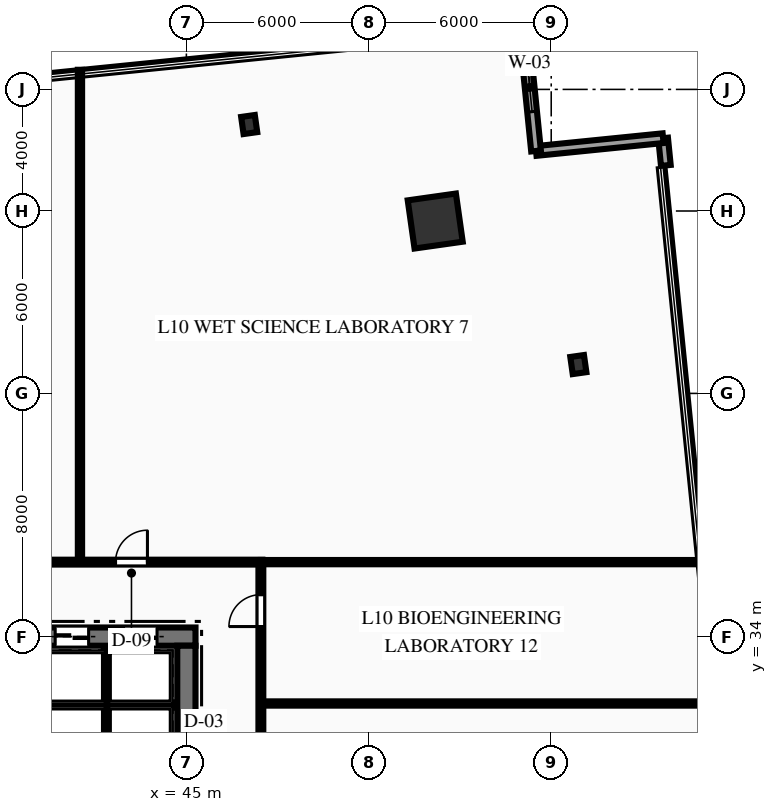
"""IFC4 building model, lengths in metres.
Left out: names, types, materials, properties, quantities, classifications, styles, units other than length and angle.
Written with IfcOpenShell. Run it as: python <this file> out.ifc"""

import sys

from ifc_helpers import new_model, si_unit, direction, frame, frame_2d, origin, origin_2d, place, context, subcontext, project, spatial, rectangle, hollow_rectangle, i_section, extrude, element, fill, save


model = new_model("IFC4")
c1 = context("Model", 3, precision=1e-05, world=origin(), true_north=direction((0.0, 1.0)))
c2 = subcontext(c1, "Body", "Model", "MODEL_VIEW")
j1 = project(units=[si_unit("LENGTHUNIT", "METRE"), si_unit("PLANEANGLEUNIT", "RADIAN")], contexts=[c1])
p1 = place(None, origin())
s1 = spatial("IfcSite", under=j1, at=p1, CompositionType="ELEMENT")
p2 = place(p1, origin())
s2 = spatial("IfcBuilding", under=s1, at=p2, CompositionType="ELEMENT")
p3 = place(p2, frame((0.0, 0.0, 47.7)))
s3 = spatial("IfcBuildingStorey", under=s2, at=p3, CompositionType="ELEMENT", Elevation=47.7)
p4 = place(p3, frame((26.7, 34.0, 0.0), z_axis=(0.0, 0.0, 1.0), x_axis=(1.0, 0.0, 0.0)))
e1 = element("IfcWall", 1, at=p4, inside=s3, PredefinedType="SHEAR", context=c2, shape_type="SweptSolid", body=[
    extrude(rectangle(XDim=18.6, YDim=0.6, at=frame_2d((9.3, 0.0))), origin(), (0.0, 0.0, 1.0), 3.75),
])
p5 = place(p4, frame((1.265, 0.0, 0.0)))
e2 = element("IfcOpeningElement", 2, at=p5, cuts=e1, PredefinedType="OPENING", context=c2, shape_type="SweptSolid", body=[
    extrude(rectangle(XDim=1.1, YDim=2.15, at=frame_2d((0.55, 1.075))), frame((0.0, 0.31, 0.0), z_axis=(0.0, -1.0, 0.0), x_axis=(1.0, 0.0, 0.0)), (0.0, 0.0, 1.0), 0.62),
])
p6 = place(p4, frame((3.515, 0.0, 0.0)))
e3 = element("IfcOpeningElement", 3, at=p6, cuts=e1, PredefinedType="OPENING", context=c2, shape_type="SweptSolid", body=[
    extrude(rectangle(XDim=1.1, YDim=2.15, at=frame_2d((0.55, 1.075))), frame((0.0, 0.31, 0.0), z_axis=(0.0, -1.0, 0.0), x_axis=(1.0, 0.0, 0.0)), (0.0, 0.0, 1.0), 0.62),
])
p7 = place(p4, frame((13.985, 0.0, 0.0)))
e4 = element("IfcOpeningElement", 4, at=p7, cuts=e1, PredefinedType="OPENING", context=c2, shape_type="SweptSolid", body=[
    extrude(rectangle(XDim=1.1, YDim=2.15, at=frame_2d((0.55, 1.075))), frame((0.0, 0.31, 0.0), z_axis=(0.0, -1.0, 0.0), x_axis=(1.0, 0.0, 0.0)), (0.0, 0.0, 1.0), 0.62),
])
p8 = place(p4, frame((16.235, 0.0, 0.0)))
e5 = element("IfcOpeningElement", 5, at=p8, cuts=e1, PredefinedType="OPENING", context=c2, shape_type="SweptSolid", body=[
    extrude(rectangle(XDim=1.1, YDim=2.15, at=frame_2d((0.55, 1.075))), frame((0.0, 0.31, 0.0), z_axis=(0.0, -1.0, 0.0), x_axis=(1.0, 0.0, 0.0)), (0.0, 0.0, 1.0), 0.62),
])
p9 = place(p3, frame((45.0, 18.3, 0.0), z_axis=(0.0, 0.0, 1.0), x_axis=(0.0, 1.0, 0.0)))
e6 = element("IfcWall", 6, at=p9, inside=s3, PredefinedType="SHEAR", context=c2, shape_type="SweptSolid", body=[
    extrude(rectangle(XDim=15.4, YDim=0.6, at=frame_2d((7.7, 0.0))), origin(), (0.0, 0.0, 1.0), 3.75),
])
p10 = place(p9, frame((9.94, 0.0, 0.0)))
e7 = element("IfcOpeningElement", 7, at=p10, cuts=e6, PredefinedType="OPENING", context=c2, shape_type="SweptSolid", body=[
    extrude(rectangle(XDim=1.4, YDim=2.2, at=frame_2d((0.7, 1.1))), frame((0.0, 0.31, 0.0), z_axis=(0.0, -1.0, 0.0), x_axis=(1.0, 0.0, 0.0)), (0.0, 0.0, 1.0), 0.62),
])
p11 = place(p3, frame((53.185, 47.67, 0.0), z_axis=(0.0, 0.0, 1.0), x_axis=(0.990146240249, 0.140037219771, 0.0)))
e8 = element("IfcColumn", 8, at=p11, inside=s3, PredefinedType="COLUMN", context=c2, shape_type="SweptSolid", body=[
    extrude(hollow_rectangle(XDim=1.6, YDim=1.6, WallThickness=0.08, at=origin_2d()), origin(), (0.0, 0.0, 1.0), 3.75),
])
for number, where, z_axis, x_axis in (
    (9, (57.892, 42.949, 0.0), (0.0, 0.0, 1.0), (0.99, 0.14, 0.0)),
    (10, (47.066, 50.844, 0.0), (0.0, 0.0, 1.0), (0.99, 0.14, 0.0)),
):
    element("IfcColumn", number, at=place(p3, frame(where, z_axis=z_axis, x_axis=x_axis)), inside=s3, PredefinedType="COLUMN", context=c2, shape_type="SweptSolid", body=[
        extrude(i_section(OverallWidth=0.454, OverallDepth=0.569, WebThickness=0.078, FlangeThickness=0.125, at=origin_2d()), origin(), (0.0, 0.0, 1.0), 3.75),
    ])
p12 = place(p3, frame((60.68, 50.396, 0.0), z_axis=(0.0, 0.0, 1.0), x_axis=(0.100094562617, -0.994977928667, 0.0)))
e11 = element("IfcWall", 11, at=p12, inside=s3, PredefinedType="STANDARD", context=c2, shape_type="SweptSolid", body=[
    extrude(rectangle(XDim=0.9, YDim=0.32, at=frame_2d((0.45, 0.0))), origin(), (0.0, 0.0, 1.0), 3.44),
])
p13 = place(p3, frame((56.501, 49.975, 0.0), z_axis=(0.0, 0.0, 1.0), x_axis=(0.994966149633, 0.100211581584, 0.0)))
e12 = element("IfcWall", 12, at=p13, inside=s3, PredefinedType="STANDARD", context=c2, shape_type="SweptSolid", body=[
    extrude(rectangle(XDim=4.2, YDim=0.32, at=frame_2d((2.1, 0.0))), origin(), (0.0, 0.0, 1.0), 3.44),
])
p14 = place(p3, frame((56.08, 54.154, 0.0), z_axis=(0.0, 0.0, 1.0), x_axis=(0.100211581584, -0.994966149633, 0.0)))
e13 = element("IfcWall", 13, at=p14, inside=s3, PredefinedType="STANDARD", context=c2, shape_type="SweptSolid", body=[
    extrude(rectangle(XDim=4.2, YDim=0.32, at=frame_2d((2.1, 0.0))), origin(), (0.0, 0.0, 1.0), 3.44),
])
p15 = place(p14, frame((1.3, 0.0, 0.85)))
e14 = element("IfcOpeningElement", 14, at=p15, cuts=e13, PredefinedType="OPENING", context=c2, shape_type="SweptSolid", body=[
    extrude(rectangle(XDim=1.6, YDim=2.1, at=frame_2d((0.8, 1.05))), frame((0.0, 0.17, 0.0), z_axis=(0.0, -1.0, 0.0), x_axis=(1.0, 0.0, 0.0)), (0.0, 0.0, 1.0), 0.34),
])
p16 = place(p3, frame((40.12, 31.75, 0.0), z_axis=(0.0, 0.0, 1.0), x_axis=(1.0, 0.0, 0.0)))
e15 = element("IfcWall", 15, at=p16, inside=s3, PredefinedType="PARTITIONING", context=c2, shape_type="SweptSolid", body=[
    extrude(rectangle(XDim=4.43, YDim=0.18, at=frame_2d((2.215, 0.0))), origin(), (0.0, 0.0, 1.0), 3.44),
])
p17 = place(p3, frame((42.37, 29.9, 0.0), z_axis=(0.0, 0.0, 1.0), x_axis=(0.0, 1.0, 0.0)))
e16 = element("IfcWall", 16, at=p17, inside=s3, PredefinedType="PARTITIONING", context=c2, shape_type="SweptSolid", body=[
    extrude(rectangle(XDim=3.75, YDim=0.18, at=frame_2d((1.875, 0.0))), origin(), (0.0, 0.0, 1.0), 3.44),
])
p18 = place(p3, frame((24.5, 36.45, 0.0), z_axis=(0.0, 0.0, 1.0), x_axis=(1.0, 0.0, 0.0)))
e17 = element("IfcWall", 17, at=p18, inside=s3, PredefinedType="PARTITIONING", context=c2, shape_type="SweptSolid", body=[
    extrude(rectangle(XDim=23.0, YDim=0.16, at=frame_2d((11.5, 0.0))), origin(), (0.0, 0.0, 1.0), 3.44),
])
p19 = place(p18, frame((1.25, 0.0, 0.0)))
e18 = element("IfcOpeningElement", 18, at=p19, cuts=e17, PredefinedType="OPENING", context=c2, shape_type="SweptSolid", body=[
    extrude(rectangle(XDim=0.9, YDim=2.15, at=frame_2d((0.45, 1.075))), frame((0.0, 0.09, 0.0), z_axis=(0.0, -1.0, 0.0), x_axis=(1.0, 0.0, 0.0)), (0.0, 0.0, 1.0), 0.18),
])
p20 = place(p18, frame((3.55, 0.0, 0.0)))
e19 = element("IfcOpeningElement", 19, at=p20, cuts=e17, PredefinedType="OPENING", context=c2, shape_type="SweptSolid", body=[
    extrude(rectangle(XDim=0.9, YDim=2.15, at=frame_2d((0.45, 1.075))), frame((0.0, 0.09, 0.0), z_axis=(0.0, -1.0, 0.0), x_axis=(1.0, 0.0, 0.0)), (0.0, 0.0, 1.0), 0.18),
])
p21 = place(p18, frame((5.8, 0.0, 0.0)))
e20 = element("IfcOpeningElement", 20, at=p21, cuts=e17, PredefinedType="OPENING", context=c2, shape_type="SweptSolid", body=[
    extrude(rectangle(XDim=1.0, YDim=2.15, at=frame_2d((0.5, 1.075))), frame((0.0, 0.09, 0.0), z_axis=(0.0, -1.0, 0.0), x_axis=(1.0, 0.0, 0.0)), (0.0, 0.0, 1.0), 0.18),
])
p22 = place(p18, frame((13.545, 0.0, 0.0)))
e21 = element("IfcOpeningElement", 21, at=p22, cuts=e17, PredefinedType="OPENING", context=c2, shape_type="SweptSolid", body=[
    extrude(rectangle(XDim=1.05, YDim=2.15, at=frame_2d((0.525, 1.075))), frame((0.0, 0.09, 0.0), z_axis=(0.0, -1.0, 0.0), x_axis=(1.0, 0.0, 0.0)), (0.0, 0.0, 1.0), 0.18),
])
p23 = place(p18, frame((18.169, 0.0, 0.0)))
e22 = element("IfcOpeningElement", 22, at=p23, cuts=e17, PredefinedType="OPENING", context=c2, shape_type="SweptSolid", body=[
    extrude(rectangle(XDim=1.05, YDim=2.15, at=frame_2d((0.525, 1.075))), frame((0.0, 0.09, 0.0), z_axis=(0.0, -1.0, 0.0), x_axis=(1.0, 0.0, 0.0)), (0.0, 0.0, 1.0), 0.18),
])
p24 = place(p3, frame((47.45, 15.55, 0.0), z_axis=(0.0, 0.0, 1.0), x_axis=(0.0, 1.0, 0.0)))
e23 = element("IfcWall", 23, at=p24, inside=s3, PredefinedType="PARTITIONING", context=c2, shape_type="SweptSolid", body=[
    extrude(rectangle(XDim=20.9, YDim=0.16, at=frame_2d((10.45, 0.0))), origin(), (0.0, 0.0, 1.0), 3.44),
])
p25 = place(p24, frame((3.067, 0.0, 0.0)))
e24 = element("IfcOpeningElement", 24, at=p25, cuts=e23, PredefinedType="OPENING", context=c2, shape_type="SweptSolid", body=[
    extrude(rectangle(XDim=1.05, YDim=2.15, at=frame_2d((0.525, 1.075))), frame((0.0, 0.09, 0.0), z_axis=(0.0, -1.0, 0.0), x_axis=(1.0, 0.0, 0.0)), (0.0, 0.0, 1.0), 0.18),
])
p26 = place(p24, frame((6.065, 0.0, 0.0)))
e25 = element("IfcOpeningElement", 25, at=p26, cuts=e23, PredefinedType="OPENING", context=c2, shape_type="SweptSolid", body=[
    extrude(rectangle(XDim=1.05, YDim=2.15, at=frame_2d((0.525, 1.075))), frame((0.0, 0.09, 0.0), z_axis=(0.0, -1.0, 0.0), x_axis=(1.0, 0.0, 0.0)), (0.0, 0.0, 1.0), 0.18),
])
p27 = place(p24, frame((11.661, 0.0, 0.0)))
e26 = element("IfcOpeningElement", 26, at=p27, cuts=e23, PredefinedType="OPENING", context=c2, shape_type="SweptSolid", body=[
    extrude(rectangle(XDim=1.05, YDim=2.15, at=frame_2d((0.525, 1.075))), frame((0.0, 0.09, 0.0), z_axis=(0.0, -1.0, 0.0), x_axis=(1.0, 0.0, 0.0)), (0.0, 0.0, 1.0), 0.18),
])
p28 = place(p24, frame((18.781, 0.0, 0.0)))
e27 = element("IfcOpeningElement", 27, at=p28, cuts=e23, PredefinedType="OPENING", context=c2, shape_type="SweptSolid", body=[
    extrude(rectangle(XDim=1.05, YDim=2.15, at=frame_2d((0.525, 1.075))), frame((0.0, 0.09, 0.0), z_axis=(0.0, -1.0, 0.0), x_axis=(1.0, 0.0, 0.0)), (0.0, 0.0, 1.0), 0.18),
])
p29 = place(p3, frame((47.45, 36.45, 0.0), z_axis=(0.0, 0.0, 1.0), x_axis=(1.0, 0.0, 0.0)))
e28 = element("IfcWall", 28, at=p29, inside=s3, PredefinedType="PARTITIONING", context=c2, shape_type="SweptSolid", body=[
    extrude(rectangle(XDim=14.594, YDim=0.14, at=frame_2d((7.297, 0.0))), origin(), (0.0, 0.0, 1.0), 3.44),
])
p30 = place(p3, frame((41.5, 36.45, 0.0), z_axis=(0.0, 0.0, 1.0), x_axis=(0.0, 1.0, 0.0)))
e29 = element("IfcWall", 29, at=p30, inside=s3, PredefinedType="PARTITIONING", context=c2, shape_type="SweptSolid", body=[
    extrude(rectangle(XDim=16.195, YDim=0.14, at=frame_2d((8.098, 0.0))), origin(), (0.0, 0.0, 1.0), 3.44),
])
p31 = place(p3, frame((47.45, 31.8, 0.0), z_axis=(0.0, 0.0, 1.0), x_axis=(1.0, 0.0, 0.0)))
e30 = element("IfcWall", 30, at=p31, inside=s3, PredefinedType="PARTITIONING", context=c2, shape_type="SweptSolid", body=[
    extrude(rectangle(XDim=15.062, YDim=0.14, at=frame_2d((7.531, 0.0))), origin(), (0.0, 0.0, 1.0), 3.44),
])
p32 = place(p15, origin())
e31 = element("IfcWindow", 31, at=p32, inside=s3, PartitioningType="SINGLE_PANEL", PredefinedType="WINDOW", context=c2, shape_type="SweptSolid", body=[
    extrude(rectangle(XDim=1.6, YDim=2.1, at=frame_2d((0.8, 1.05))), frame((0.0, 0.03, 0.0), z_axis=(0.0, -1.0, 0.0), x_axis=(1.0, 0.0, 0.0)), (0.0, 0.0, 1.0), 0.06),
])
fill(e14, e31)
p33 = place(p23, origin())
e32 = element("IfcDoor", 32, at=p33, inside=s3, OperationType="SINGLE_SWING_RIGHT", PredefinedType="DOOR", context=c2, shape_type="SweptSolid", body=[
    extrude(rectangle(XDim=1.05, YDim=2.15, at=frame_2d((0.525, 1.075))), frame((0.0, 0.025, 0.0), z_axis=(0.0, -1.0, 0.0), x_axis=(1.0, 0.0, 0.0)), (0.0, 0.0, 1.0), 0.05),
])
fill(e22, e32)
p34 = place(p28, origin())
e33 = element("IfcDoor", 33, at=p34, inside=s3, OperationType="SINGLE_SWING_LEFT", PredefinedType="DOOR", context=c2, shape_type="SweptSolid", body=[
    extrude(rectangle(XDim=1.05, YDim=2.15, at=frame_2d((0.525, 1.075))), frame((0.0, 0.025, 0.0), z_axis=(0.0, -1.0, 0.0), x_axis=(1.0, 0.0, 0.0)), (0.0, 0.0, 1.0), 0.05),
])
fill(e27, e33)
p35 = place(p7, origin())
e34 = element("IfcDoor", 34, at=p35, inside=s3, OperationType="SLIDING_TO_LEFT", PredefinedType="DOOR", context=c2, shape_type="SweptSolid", body=[
    extrude(rectangle(XDim=1.1, YDim=2.15, at=frame_2d((0.55, 1.075))), frame((0.0, 0.025, 0.0), z_axis=(0.0, -1.0, 0.0), x_axis=(1.0, 0.0, 0.0)), (0.0, 0.0, 1.0), 0.05),
])
fill(e4, e34)
p36 = place(p8, origin())
e35 = element("IfcDoor", 35, at=p36, inside=s3, OperationType="SLIDING_TO_LEFT", PredefinedType="DOOR", context=c2, shape_type="SweptSolid", body=[
    extrude(rectangle(XDim=1.1, YDim=2.15, at=frame_2d((0.55, 1.075))), frame((0.0, 0.025, 0.0), z_axis=(0.0, -1.0, 0.0), x_axis=(1.0, 0.0, 0.0)), (0.0, 0.0, 1.0), 0.05),
])
fill(e5, e35)
save(model, sys.argv[1])
